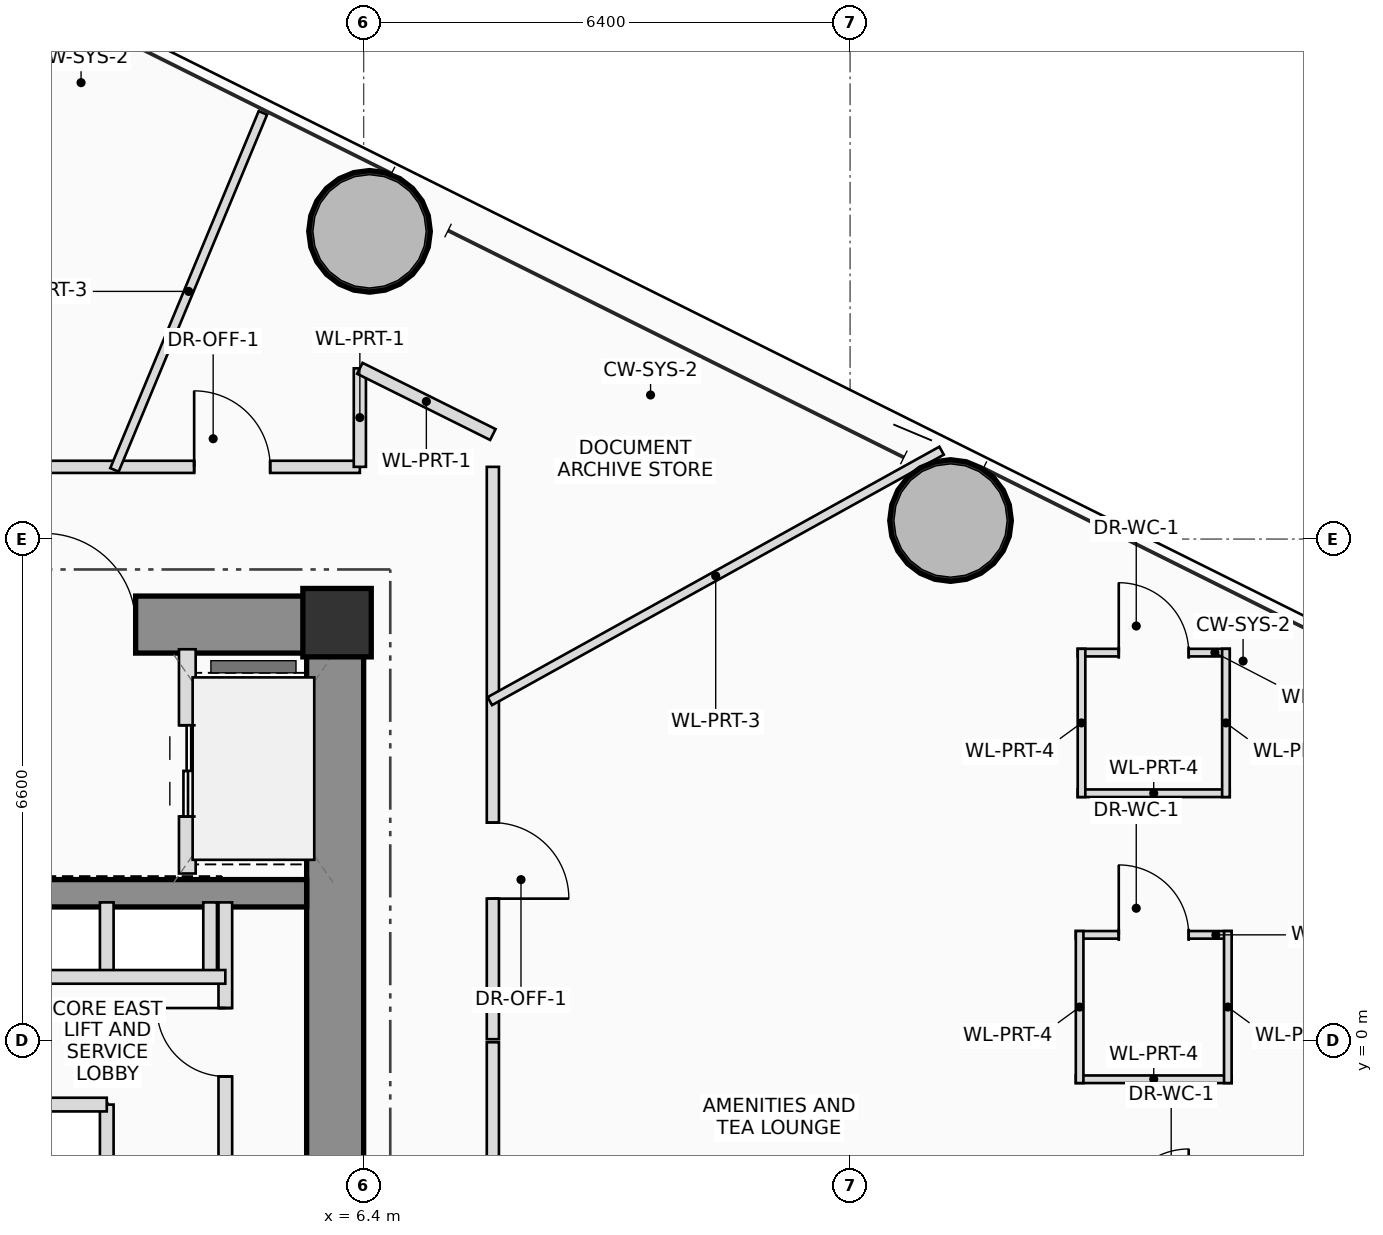
"""IFC4 building model, lengths in metres.
Left out: names, types, materials, properties, quantities, classifications, styles, units other than length and angle.
Written with IfcOpenShell. Run it as: python <this file> out.ifc"""

import sys

from ifc_helpers import new_model, si_unit, direction, frame, frame_2d, origin, origin_2d, place, context, subcontext, project, spatial, rectangle, hollow_circle, extrude, source, transform, mapped, element, fill, save


model = new_model("IFC4")
c1 = context("Model", 3, precision=1e-05, world=origin(), true_north=direction((0.0, 1.0)))
c2 = subcontext(c1, "Body", "Model", "MODEL_VIEW")
j1 = project(units=[si_unit("LENGTHUNIT", "METRE"), si_unit("PLANEANGLEUNIT", "RADIAN")], contexts=[c1])
p1 = place(None, origin())
s1 = spatial("IfcSite", under=j1, at=p1, CompositionType="ELEMENT")
p2 = place(p1, origin())
s2 = spatial("IfcBuilding", under=s1, at=p2, CompositionType="ELEMENT")
p3 = place(p2, frame((0.0, 0.0, 34.9)))
s3 = spatial("IfcBuildingStorey", under=s2, at=p3, CompositionType="ELEMENT", Elevation=34.9)
m1 = source(origin(), c2, "Body", "SweptSolid", [
    extrude(rectangle(XDim=0.9, YDim=0.9, at=origin_2d()), origin(), (0.0, 0.0, 1.0), 3.7),
])
p4 = place(p3, frame((6.05, 5.5, 0.0), z_axis=(0.0, 0.0, 1.0), x_axis=(1.0, 0.0, 0.0)))
e1 = element("IfcColumn", 1, at=p4, inside=s3, PredefinedType="COLUMN", context=c2, shape_type="MappedRepresentation", body=[
    mapped(m1, transform((0.0, 0.0, 0.0), scale=1.0)),
])
p5 = place(p3, frame((-6.4, 5.475, 0.0), z_axis=(0.0, 0.0, 1.0), x_axis=(1.0, 0.0, 0.0)))
e2 = element("IfcWall", 2, at=p5, inside=s3, PredefinedType="SHEAR", context=c2, shape_type="SweptSolid", body=[
    extrude(rectangle(XDim=12.8, YDim=0.75, at=frame_2d((6.4, 0.0))), origin(), (0.0, 0.0, 1.0), 3.7),
])
p6 = place(p5, frame((8.6, 0.0, 0.0)))
e3 = element("IfcOpeningElement", 3, at=p6, cuts=e2, PredefinedType="OPENING", context=c2, shape_type="SweptSolid", body=[
    extrude(rectangle(XDim=1.2, YDim=2.2, at=frame_2d((0.6, 1.1))), frame((0.0, 0.385, 0.0), z_axis=(0.0, -1.0, 0.0), x_axis=(1.0, 0.0, 0.0)), (0.0, 0.0, 1.0), 0.77),
])
p7 = place(p3, frame((6.025, -5.1, 0.0), z_axis=(0.0, 0.0, 1.0), x_axis=(0.0, 1.0, 0.0)))
e4 = element("IfcWall", 4, at=p7, inside=s3, PredefinedType="SHEAR", context=c2, shape_type="SweptSolid", body=[
    extrude(rectangle(XDim=10.2, YDim=0.75, at=frame_2d((5.1, 0.0))), origin(), (0.0, 0.0, 1.0), 3.7),
])
p8 = place(p3, frame((-5.65, 1.94, 0.0), z_axis=(0.0, 0.0, 1.0), x_axis=(1.0, 0.0, 0.0)))
e5 = element("IfcWall", 5, at=p8, inside=s3, PredefinedType="SHEAR", context=c2, shape_type="SweptSolid", body=[
    extrude(rectangle(XDim=11.3, YDim=0.36, at=frame_2d((5.65, 0.0))), origin(), (0.0, 0.0, 1.0), 3.7),
])
m2 = source(origin(), c2, "Body", "SweptSolid", [
    extrude(hollow_circle(Radius=0.8, WallThickness=0.055, at=origin_2d()), origin(), (0.0, 0.0, 1.0), 3.7),
])
for number, where, z_axis, x_axis in (
    (6, (14.122, 6.844, 0.0), (0.0, 0.0, 1.0), (1.0, 0.0, 0.0)),
    (7, (6.477, 10.648, 0.0), (0.0, 0.0, 1.0), (1.0, 0.0, 0.0)),
):
    element("IfcColumn", number, at=place(p3, frame(where, z_axis=z_axis, x_axis=x_axis)), inside=s3, PredefinedType="COLUMN", context=c2, shape_type="MappedRepresentation", body=[
        mapped(m2, transform((0.0, 0.0, 0.0), scale=1.0)),
    ])
p9 = place(p3, frame((4.08, 2.2, 0.0), z_axis=(0.0, 0.0, 1.0), x_axis=(0.0, 1.0, 0.0)))
e8 = element("IfcWall", 8, at=p9, inside=s3, PredefinedType="PLUMBINGWALL", context=c2, shape_type="SweptSolid", body=[
    extrude(rectangle(XDim=2.95, YDim=0.22, at=frame_2d((1.475, 0.0))), origin(), (0.0, 0.0, 1.0), 3.495),
])
p10 = place(p9, frame((0.75, 0.0, 0.0)))
e9 = element("IfcOpeningElement", 9, at=p10, cuts=e8, PredefinedType="OPENING", context=c2, shape_type="SweptSolid", body=[
    extrude(rectangle(XDim=1.2, YDim=2.25, at=frame_2d((0.6, 1.125))), frame((0.0, 0.12, 0.0), z_axis=(0.0, -1.0, 0.0), x_axis=(1.0, 0.0, 0.0)), (0.0, 0.0, 1.0), 0.24),
])
for number, where, z_axis, x_axis in (
    (10, (3.02, 0.84, 0.0), (0.0, 0.0, 1.0), (0.0, 1.0, 0.0)),
    (11, (4.38, 0.84, 0.0), (0.0, 0.0, 1.0), (0.0, 1.0, 0.0)),
    (12, (3.02, -1.82, 0.0), (0.0, 0.0, 1.0), (0.0, 1.0, 0.0)),
):
    element("IfcWall", number, at=place(p3, frame(where, z_axis=z_axis, x_axis=x_axis)), inside=s3, PredefinedType="PLUMBINGWALL", context=c2, shape_type="SweptSolid", body=[
        extrude(rectangle(XDim=0.98, YDim=0.18, at=frame_2d((0.49, 0.0))), origin(), (0.0, 0.0, 1.0), 3.495),
    ])
p11 = place(p3, frame((4.58, -1.82, 0.0), z_axis=(0.0, 0.0, 1.0), x_axis=(0.0, 1.0, 0.0)))
e13 = element("IfcWall", 13, at=p11, inside=s3, PredefinedType="PLUMBINGWALL", context=c2, shape_type="SweptSolid", body=[
    extrude(rectangle(XDim=3.64, YDim=0.18, at=frame_2d((1.82, 0.0))), origin(), (0.0, 0.0, 1.0), 3.495),
])
p12 = place(p11, frame((1.35, 0.0, 0.0)))
e14 = element("IfcOpeningElement", 14, at=p12, cuts=e13, PredefinedType="OPENING", context=c2, shape_type="SweptSolid", body=[
    extrude(rectangle(XDim=0.9, YDim=2.05, at=frame_2d((0.45, 1.025))), frame((0.0, 0.1, 0.0), z_axis=(0.0, -1.0, 0.0), x_axis=(1.0, 0.0, 0.0)), (0.0, 0.0, 1.0), 0.2),
])
p13 = place(p3, frame((-5.68, 0.84, 0.0), z_axis=(0.0, 0.0, 1.0), x_axis=(1.0, 0.0, 0.0)))
e15 = element("IfcWall", 15, at=p13, inside=s3, PredefinedType="PLUMBINGWALL", context=c2, shape_type="SweptSolid", body=[
    extrude(rectangle(XDim=10.26, YDim=0.18, at=frame_2d((5.13, 0.0))), origin(), (0.0, 0.0, 1.0), 3.495),
])
p14 = place(p13, frame((0.43, 0.0, 0.0)))
e16 = element("IfcOpeningElement", 16, at=p14, cuts=e15, PredefinedType="OPENING", context=c2, shape_type="SweptSolid", body=[
    extrude(rectangle(XDim=1.1, YDim=2.2, at=frame_2d((0.55, 1.1))), frame((0.0, 0.1, 0.0), z_axis=(0.0, -1.0, 0.0), x_axis=(1.0, 0.0, 0.0)), (0.0, 0.0, 1.0), 0.2),
])
p15 = place(p13, frame((2.13, 0.0, 0.0)))
e17 = element("IfcOpeningElement", 17, at=p15, cuts=e15, PredefinedType="OPENING", context=c2, shape_type="SweptSolid", body=[
    extrude(rectangle(XDim=1.1, YDim=2.2, at=frame_2d((0.55, 1.1))), frame((0.0, 0.1, 0.0), z_axis=(0.0, -1.0, 0.0), x_axis=(1.0, 0.0, 0.0)), (0.0, 0.0, 1.0), 0.2),
])
p16 = place(p3, frame((-5.68, -0.84, 0.0), z_axis=(0.0, 0.0, 1.0), x_axis=(1.0, 0.0, 0.0)))
e18 = element("IfcWall", 18, at=p16, inside=s3, PredefinedType="PLUMBINGWALL", context=c2, shape_type="SweptSolid", body=[
    extrude(rectangle(XDim=8.7, YDim=0.18, at=frame_2d((4.35, 0.0))), origin(), (0.0, 0.0, 1.0), 3.495),
])
p17 = place(p16, frame((0.43, 0.0, 0.0)))
e19 = element("IfcOpeningElement", 19, at=p17, cuts=e18, PredefinedType="OPENING", context=c2, shape_type="SweptSolid", body=[
    extrude(rectangle(XDim=1.1, YDim=2.2, at=frame_2d((0.55, 1.1))), frame((0.0, 0.1, 0.0), z_axis=(0.0, -1.0, 0.0), x_axis=(1.0, 0.0, 0.0)), (0.0, 0.0, 1.0), 0.2),
])
p18 = place(p16, frame((2.13, 0.0, 0.0)))
e20 = element("IfcOpeningElement", 20, at=p18, cuts=e18, PredefinedType="OPENING", context=c2, shape_type="SweptSolid", body=[
    extrude(rectangle(XDim=1.1, YDim=2.2, at=frame_2d((0.55, 1.1))), frame((0.0, 0.1, 0.0), z_axis=(0.0, -1.0, 0.0), x_axis=(1.0, 0.0, 0.0)), (0.0, 0.0, 1.0), 0.2),
])
p19 = place(p3, frame((15.77, 1.393, 0.0), z_axis=(0.0, 0.0, 1.0), x_axis=(1.0, 0.0, 0.0)))
e21 = element("IfcWall", 21, at=p19, inside=s3, PredefinedType="PARTITIONING", context=c2, shape_type="SweptSolid", body=[
    extrude(rectangle(XDim=2.05, YDim=0.1, at=frame_2d((1.025, 0.0))), origin(), (0.0, 0.0, 1.0), 3.15),
])
p20 = place(p19, frame((0.565, 0.0, 0.0)))
e22 = element("IfcOpeningElement", 22, at=p20, cuts=e21, PredefinedType="OPENING", context=c2, shape_type="SweptSolid", body=[
    extrude(rectangle(XDim=0.92, YDim=2.1, at=frame_2d((0.46, 1.05))), frame((0.0, 0.06, 0.0), z_axis=(0.0, -1.0, 0.0), x_axis=(1.0, 0.0, 0.0)), (0.0, 0.0, 1.0), 0.12),
])
p21 = place(p3, frame((17.82, -0.507, 0.0), z_axis=(0.0, 0.0, 1.0), x_axis=(-1.0, 0.0, 0.0)))
e23 = element("IfcWall", 23, at=p21, inside=s3, PredefinedType="PARTITIONING", context=c2, shape_type="SweptSolid", body=[
    extrude(rectangle(XDim=2.05, YDim=0.1, at=frame_2d((1.025, 0.0))), origin(), (0.0, 0.0, 1.0), 3.15),
])
p22 = place(p3, frame((17.77, 1.443, 0.0), z_axis=(0.0, 0.0, 1.0), x_axis=(0.0, -1.0, 0.0)))
e24 = element("IfcWall", 24, at=p22, inside=s3, PredefinedType="PARTITIONING", context=c2, shape_type="SweptSolid", body=[
    extrude(rectangle(XDim=2.0, YDim=0.1, at=frame_2d((1.0, 0.0))), origin(), (0.0, 0.0, 1.0), 3.15),
])
p23 = place(p3, frame((15.82, -0.557, 0.0), z_axis=(0.0, 0.0, 1.0), x_axis=(0.0, 1.0, 0.0)))
e25 = element("IfcWall", 25, at=p23, inside=s3, PredefinedType="PARTITIONING", context=c2, shape_type="SweptSolid", body=[
    extrude(rectangle(XDim=2.0, YDim=0.1, at=frame_2d((1.0, 0.0))), origin(), (0.0, 0.0, 1.0), 3.495),
])
p24 = place(p3, frame((15.795, 5.106, 0.0), z_axis=(0.0, 0.0, 1.0), x_axis=(1.0, 0.0, 0.0)))
e26 = element("IfcWall", 26, at=p24, inside=s3, PredefinedType="PARTITIONING", context=c2, shape_type="SweptSolid", body=[
    extrude(rectangle(XDim=2.0, YDim=0.1, at=frame_2d((1.0, 0.0))), origin(), (0.0, 0.0, 1.0), 2.96),
])
p25 = place(p24, frame((0.54, 0.0, 0.0)))
e27 = element("IfcOpeningElement", 27, at=p25, cuts=e26, PredefinedType="OPENING", context=c2, shape_type="SweptSolid", body=[
    extrude(rectangle(XDim=0.92, YDim=2.1, at=frame_2d((0.46, 1.05))), frame((0.0, 0.06, 0.0), z_axis=(0.0, -1.0, 0.0), x_axis=(1.0, 0.0, 0.0)), (0.0, 0.0, 1.0), 0.12),
])
p26 = place(p3, frame((17.795, 3.256, 0.0), z_axis=(0.0, 0.0, 1.0), x_axis=(-1.0, 0.0, 0.0)))
e28 = element("IfcWall", 28, at=p26, inside=s3, PredefinedType="PARTITIONING", context=c2, shape_type="SweptSolid", body=[
    extrude(rectangle(XDim=2.0, YDim=0.1, at=frame_2d((1.0, 0.0))), origin(), (0.0, 0.0, 1.0), 3.15),
])
for number, where, z_axis, x_axis in (
    (29, (17.745, 5.156, 0.0), (0.0, 0.0, 1.0), (0.0, -1.0, 0.0)),
    (30, (15.845, 3.206, 0.0), (0.0, 0.0, 1.0), (0.0, 1.0, 0.0)),
):
    element("IfcWall", number, at=place(p3, frame(where, z_axis=z_axis, x_axis=x_axis)), inside=s3, PredefinedType="PARTITIONING", context=c2, shape_type="SweptSolid", body=[
        extrude(rectangle(XDim=1.95, YDim=0.1, at=frame_2d((0.975, 0.0))), origin(), (0.0, 0.0, 1.0), 2.8),
    ])
p27 = place(p3, frame((-6.35, 7.55, 0.0), z_axis=(0.0, 0.0, 1.0), x_axis=(1.0, 0.0, 0.0)))
e31 = element("IfcWall", 31, at=p27, inside=s3, PredefinedType="PARTITIONING", context=c2, shape_type="SweptSolid", body=[
    extrude(rectangle(XDim=12.7, YDim=0.16, at=frame_2d((6.35, 0.0))), origin(), (0.0, 0.0, 1.0), 2.8),
])
p28 = place(p27, frame((10.52, 0.0, 0.0)))
e32 = element("IfcOpeningElement", 32, at=p28, cuts=e31, PredefinedType="OPENING", context=c2, shape_type="SweptSolid", body=[
    extrude(rectangle(XDim=1.0, YDim=2.25, at=frame_2d((0.5, 1.125))), frame((0.0, 0.09, 0.0), z_axis=(0.0, -1.0, 0.0), x_axis=(1.0, 0.0, 0.0)), (0.0, 0.0, 1.0), 0.18),
])
p29 = place(p3, frame((6.35, 7.55, 0.0), z_axis=(0.0, 0.0, 1.0), x_axis=(0.0, 1.0, 0.0)))
e33 = element("IfcWall", 33, at=p29, inside=s3, PredefinedType="PARTITIONING", context=c2, shape_type="SweptSolid", body=[
    extrude(rectangle(XDim=1.296, YDim=0.16, at=frame_2d((0.648, 0.0))), origin(), (0.0, 0.0, 1.0), 2.8),
])
p30 = place(p3, frame((6.35, 8.846, 0.0), z_axis=(0.0, 0.0, 1.0), x_axis=(0.89527489017, -0.445514164793, 0.0)))
e34 = element("IfcWall", 34, at=p30, inside=s3, PredefinedType="PARTITIONING", context=c2, shape_type="SweptSolid", body=[
    extrude(rectangle(XDim=1.955, YDim=0.16, at=frame_2d((0.977, 0.0))), origin(), (0.0, 0.0, 1.0), 2.8),
])
p31 = place(p3, frame((8.1, 7.55, 0.0), z_axis=(0.0, 0.0, 1.0), x_axis=(0.0, -1.0, 0.0)))
e35 = element("IfcWall", 35, at=p31, inside=s3, PredefinedType="PARTITIONING", context=c2, shape_type="SweptSolid", body=[
    extrude(rectangle(XDim=7.53, YDim=0.16, at=frame_2d((3.765, 0.0))), origin(), (0.0, 0.0, 1.0), 2.8),
])
p32 = place(p31, frame((4.681, 0.0, 0.0)))
e36 = element("IfcOpeningElement", 36, at=p32, cuts=e35, PredefinedType="OPENING", context=c2, shape_type="SweptSolid", body=[
    extrude(rectangle(XDim=1.0, YDim=2.25, at=frame_2d((0.5, 1.125))), frame((0.0, 0.09, 0.0), z_axis=(0.0, -1.0, 0.0), x_axis=(1.0, 0.0, 0.0)), (0.0, 0.0, 1.0), 0.18),
])
p33 = place(p3, frame((8.1, -0.02, 0.0), z_axis=(0.0, 0.0, 1.0), x_axis=(0.0, -1.0, 0.0)))
e37 = element("IfcWall", 37, at=p33, inside=s3, PredefinedType="PARTITIONING", context=c2, shape_type="SweptSolid", body=[
    extrude(rectangle(XDim=7.53, YDim=0.16, at=frame_2d((3.765, 0.0))), origin(), (0.0, 0.0, 1.0), 2.8),
])
p34 = place(p3, frame((8.06, 4.468, 0.0), z_axis=(0.0, 0.0, 1.0), x_axis=(0.874622878111, 0.484803899618, 0.0)))
e38 = element("IfcWall", 38, at=p34, inside=s3, PredefinedType="PARTITIONING", context=c2, shape_type="SweptSolid", body=[
    extrude(rectangle(XDim=6.796, YDim=0.12, at=frame_2d((3.398, 0.0))), origin(), (0.0, 0.0, 1.0), 2.8),
])
p35 = place(p3, frame((3.122, 7.51, 0.0), z_axis=(0.0, 0.0, 1.0), x_axis=(0.383885926118, 0.923380525963, 0.0)))
e39 = element("IfcWall", 39, at=p35, inside=s3, PredefinedType="PARTITIONING", context=c2, shape_type="SweptSolid", body=[
    extrude(rectangle(XDim=5.086, YDim=0.12, at=frame_2d((2.543, 0.0))), origin(), (0.0, 0.0, 1.0), 2.96),
])
p36 = place(p6, origin())
e40 = element("IfcDoor", 40, at=p36, inside=s3, OperationType="SINGLE_SWING_LEFT", PredefinedType="DOOR", context=c2, shape_type="SweptSolid", body=[
    extrude(rectangle(XDim=1.2, YDim=2.2, at=frame_2d((0.6, 1.1))), frame((0.0, 0.025, 0.0), z_axis=(0.0, -1.0, 0.0), x_axis=(1.0, 0.0, 0.0)), (0.0, 0.0, 1.0), 0.05),
])
fill(e3, e40)
p37 = place(p10, origin())
e41 = element("IfcDoor", 41, at=p37, inside=s3, OperationType="DOUBLE_DOOR_SLIDING", PredefinedType="DOOR", context=c2, shape_type="SweptSolid", body=[
    extrude(rectangle(XDim=1.2, YDim=2.25, at=frame_2d((0.6, 1.125))), frame((0.0, 0.025, 0.0), z_axis=(0.0, -1.0, 0.0), x_axis=(1.0, 0.0, 0.0)), (0.0, 0.0, 1.0), 0.05),
])
fill(e9, e41)
p38 = place(p12, origin())
e42 = element("IfcDoor", 42, at=p38, inside=s3, OperationType="SINGLE_SWING_RIGHT", PredefinedType="DOOR", context=c2, shape_type="SweptSolid", body=[
    extrude(rectangle(XDim=0.9, YDim=2.05, at=frame_2d((0.45, 1.025))), frame((0.0, 0.025, 0.0), z_axis=(0.0, -1.0, 0.0), x_axis=(1.0, 0.0, 0.0)), (0.0, 0.0, 1.0), 0.05),
])
fill(e14, e42)
p39 = place(p20, origin())
e43 = element("IfcDoor", 43, at=p39, inside=s3, OperationType="SINGLE_SWING_LEFT", PredefinedType="DOOR", context=c2, shape_type="SweptSolid", body=[
    extrude(rectangle(XDim=0.92, YDim=2.1, at=frame_2d((0.46, 1.05))), frame((0.0, 0.025, 0.0), z_axis=(0.0, -1.0, 0.0), x_axis=(1.0, 0.0, 0.0)), (0.0, 0.0, 1.0), 0.05),
])
fill(e22, e43)
p40 = place(p25, origin())
e44 = element("IfcDoor", 44, at=p40, inside=s3, OperationType="SINGLE_SWING_LEFT", PredefinedType="DOOR", context=c2, shape_type="SweptSolid", body=[
    extrude(rectangle(XDim=0.92, YDim=2.1, at=frame_2d((0.46, 1.05))), frame((0.0, 0.025, 0.0), z_axis=(0.0, -1.0, 0.0), x_axis=(1.0, 0.0, 0.0)), (0.0, 0.0, 1.0), 0.05),
])
fill(e27, e44)
p41 = place(p28, origin())
e45 = element("IfcDoor", 45, at=p41, inside=s3, OperationType="SINGLE_SWING_LEFT", PredefinedType="DOOR", context=c2, shape_type="SweptSolid", body=[
    extrude(rectangle(XDim=1.0, YDim=2.25, at=frame_2d((0.5, 1.125))), frame((0.0, 0.025, 0.0), z_axis=(0.0, -1.0, 0.0), x_axis=(1.0, 0.0, 0.0)), (0.0, 0.0, 1.0), 0.05),
])
fill(e32, e45)
p42 = place(p32, origin())
e46 = element("IfcDoor", 46, at=p42, inside=s3, OperationType="SINGLE_SWING_RIGHT", PredefinedType="DOOR", context=c2, shape_type="SweptSolid", body=[
    extrude(rectangle(XDim=1.0, YDim=2.25, at=frame_2d((0.5, 1.125))), frame((0.0, 0.025, 0.0), z_axis=(0.0, -1.0, 0.0), x_axis=(1.0, 0.0, 0.0)), (0.0, 0.0, 1.0), 0.05),
])
fill(e36, e46)
save(model, sys.argv[1])
